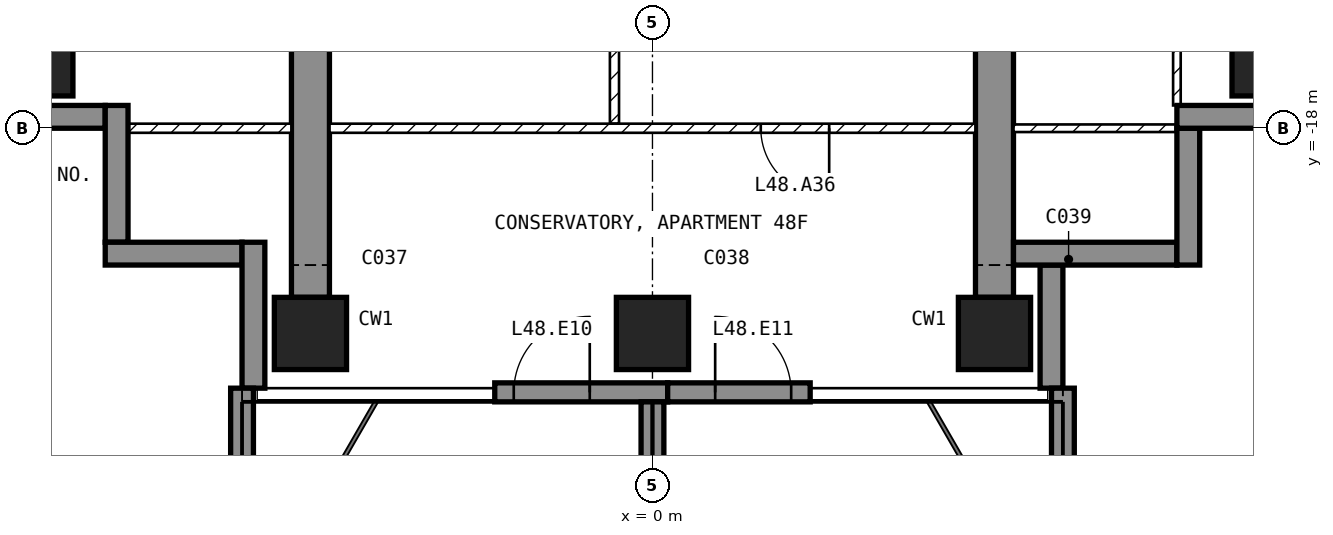
"""IFC4 building model, lengths in metres.
Left out: names, types, materials, properties, quantities, classifications, styles, units other than length and angle.
Written with IfcOpenShell. Run it as: python <this file> out.ifc"""

import sys

from ifc_helpers import new_model, si_unit, direction, frame, frame_2d, origin, origin_2d, place, context, subcontext, project, spatial, polyline, rectangle, outline, extrude, element, fill, save


model = new_model("IFC4")
c1 = context("Model", 3, precision=1e-05, world=origin(), true_north=direction((0.0, 1.0)))
c2 = subcontext(c1, "Body", "Model", "MODEL_VIEW")
j1 = project(units=[si_unit("LENGTHUNIT", "METRE"), si_unit("PLANEANGLEUNIT", "RADIAN")], contexts=[c1])
p1 = place(None, origin())
s1 = spatial("IfcSite", under=j1, at=p1, CompositionType="ELEMENT")
p2 = place(p1, origin())
s2 = spatial("IfcBuilding", under=s1, at=p2, CompositionType="ELEMENT")
p3 = place(p2, frame((0.0, 0.0, 194.6)))
s3 = spatial("IfcBuildingStorey", under=s2, at=p3, CompositionType="ELEMENT", Elevation=194.6)
for number, where, z_axis, x_axis in (
    (1, (-8.1, -17.1, -0.25), (0.0, 0.0, 1.0), (1.0, 0.0, 0.0)),
    (2, (-4.5, -20.7, -0.25), (0.0, 0.0, 1.0), (1.0, 0.0, 0.0)),
    (3, (0.0, -20.7, -0.25), (0.0, 0.0, 1.0), (1.0, 0.0, 0.0)),
    (4, (4.5, -20.7, -0.25), (0.0, 0.0, 1.0), (1.0, 0.0, 0.0)),
    (5, (8.1, -17.1, -0.25), (0.0, 0.0, 1.0), (1.0, 0.0, 0.0)),
):
    element("IfcColumn", number, at=place(p3, frame(where, z_axis=z_axis, x_axis=x_axis)), inside=s3, PredefinedType="COLUMN", context=c2, shape_type="SweptSolid", body=[
        extrude(rectangle(XDim=0.95, YDim=0.95, at=origin_2d()), origin(), (0.0, 0.0, 1.0), 3.5),
    ])
for number, where, z_axis, x_axis in (
    (6, (-4.75, -20.225, -0.25), (1.0, 0.0, 0.0), (0.0, 1.0, 0.0)),
    (7, (4.25, -20.225, -0.25), (1.0, 0.0, 0.0), (0.0, 1.0, 0.0)),
):
    element("IfcWall", number, at=place(p3, frame(where, z_axis=z_axis, x_axis=x_axis)), inside=s3, PredefinedType="SHEAR", context=c2, shape_type="SweptSolid", body=[
        extrude(outline(polyline([(0.0, 0.0), (6.725, 0.0), (6.725, 2.65), (9.125, 2.65), (9.125, 0.0), (11.225, 0.0), (11.225, 3.5), (0.0, 3.5), (0.0, 0.0)])), origin(), (0.0, 0.0, 1.0), 0.5),
    ])
p4 = place(p3, frame((-2.075, -21.475, 0.0), z_axis=(0.0, 0.0, 1.0), x_axis=(1.0, 0.0, 0.0)))
e8 = element("IfcWall", 8, at=p4, inside=s3, PredefinedType="SOLIDWALL", context=c2, shape_type="SweptSolid", body=[
    extrude(rectangle(XDim=2.275, YDim=0.25, at=frame_2d((1.137, 0.0))), origin(), (0.0, 0.0, 1.0), 3.25),
])
p5 = place(p4, frame((0.25, 0.0, 0.0)))
e9 = element("IfcOpeningElement", 9, at=p5, cuts=e8, PredefinedType="OPENING", context=c2, shape_type="SweptSolid", body=[
    extrude(rectangle(XDim=1.0, YDim=2.4, at=frame_2d((0.5, 1.2))), frame((0.0, 0.135, 0.0), z_axis=(0.0, -1.0, 0.0), x_axis=(1.0, 0.0, 0.0)), (0.0, 0.0, 1.0), 0.27),
])
p6 = place(p3, frame((0.2, -21.475, 0.0), z_axis=(0.0, 0.0, 1.0), x_axis=(1.0, 0.0, 0.0)))
e10 = element("IfcWall", 10, at=p6, inside=s3, PredefinedType="SOLIDWALL", context=c2, shape_type="SweptSolid", body=[
    extrude(rectangle(XDim=1.875, YDim=0.25, at=frame_2d((0.938, 0.0))), origin(), (0.0, 0.0, 1.0), 3.25),
])
p7 = place(p6, frame((0.625, 0.0, 0.0)))
e11 = element("IfcOpeningElement", 11, at=p7, cuts=e10, PredefinedType="OPENING", context=c2, shape_type="SweptSolid", body=[
    extrude(rectangle(XDim=1.0, YDim=2.4, at=frame_2d((0.5, 1.2))), frame((0.0, 0.135, 0.0), z_axis=(0.0, -1.0, 0.0), x_axis=(1.0, 0.0, 0.0)), (0.0, 0.0, 1.0), 0.27),
])
p8 = place(p3, frame((5.25, -21.42, 0.0), z_axis=(0.0, 0.0, 1.0), x_axis=(0.0, 1.0, 0.0)))
e12 = element("IfcWall", 12, at=p8, inside=s3, PredefinedType="SOLIDWALL", context=c2, shape_type="SweptSolid", body=[
    extrude(rectangle(XDim=1.62, YDim=0.3, at=frame_2d((0.81, 0.0))), origin(), (0.0, 0.0, 1.0), 3.25),
])
p9 = place(p3, frame((4.75, -19.65, 0.0), z_axis=(0.0, 0.0, 1.0), x_axis=(1.0, 0.0, 0.0)))
e13 = element("IfcWall", 13, at=p9, inside=s3, PredefinedType="SOLIDWALL", context=c2, shape_type="SweptSolid", body=[
    extrude(rectangle(XDim=2.15, YDim=0.3, at=frame_2d((1.075, 0.0))), origin(), (0.0, 0.0, 1.0), 3.25),
])
p10 = place(p3, frame((7.05, -19.8, 0.0), z_axis=(0.0, 0.0, 1.0), x_axis=(0.0, 1.0, 0.0)))
e14 = element("IfcWall", 14, at=p10, inside=s3, PredefinedType="SOLIDWALL", context=c2, shape_type="SweptSolid", body=[
    extrude(rectangle(XDim=1.8, YDim=0.3, at=frame_2d((0.9, 0.0))), origin(), (0.0, 0.0, 1.0), 3.25),
])
p11 = place(p3, frame((6.9, -17.85, 0.0), z_axis=(0.0, 0.0, 1.0), x_axis=(1.0, 0.0, 0.0)))
e15 = element("IfcWall", 15, at=p11, inside=s3, PredefinedType="SOLIDWALL", context=c2, shape_type="SweptSolid", body=[
    extrude(rectangle(XDim=1.85, YDim=0.3, at=frame_2d((0.925, 0.0))), origin(), (0.0, 0.0, 1.0), 3.25),
])
p12 = place(p3, frame((-8.75, -17.85, 0.0), z_axis=(0.0, 0.0, 1.0), x_axis=(1.0, 0.0, 0.0)))
e16 = element("IfcWall", 16, at=p12, inside=s3, PredefinedType="SOLIDWALL", context=c2, shape_type="SweptSolid", body=[
    extrude(rectangle(XDim=1.55, YDim=0.3, at=frame_2d((0.775, 0.0))), origin(), (0.0, 0.0, 1.0), 3.25),
])
for number, where, z_axis, x_axis in (
    (17, (-7.05, -17.7, 0.0), (0.0, 0.0, 1.0), (0.0, -1.0, 0.0)),
    (18, (-7.2, -19.65, 0.0), (0.0, 0.0, 1.0), (1.0, 0.0, 0.0)),
):
    element("IfcWall", number, at=place(p3, frame(where, z_axis=z_axis, x_axis=x_axis)), inside=s3, PredefinedType="SOLIDWALL", context=c2, shape_type="SweptSolid", body=[
        extrude(rectangle(XDim=1.8, YDim=0.3, at=frame_2d((0.9, 0.0))), origin(), (0.0, 0.0, 1.0), 3.25),
    ])
p13 = place(p3, frame((-5.25, -19.5, 0.0), z_axis=(0.0, 0.0, 1.0), x_axis=(0.0, -1.0, 0.0)))
e19 = element("IfcWall", 19, at=p13, inside=s3, PredefinedType="SOLIDWALL", context=c2, shape_type="SweptSolid", body=[
    extrude(rectangle(XDim=1.92, YDim=0.3, at=frame_2d((0.96, 0.0))), origin(), (0.0, 0.0, 1.0), 3.25),
])
p14 = place(p3, frame((-5.4, -21.42, 0.0), z_axis=(0.0, 0.0, 1.0), x_axis=(0.0, -1.0, 0.0)))
e20 = element("IfcWall", 20, at=p14, inside=s3, PredefinedType="SOLIDWALL", context=c2, shape_type="SweptSolid", body=[
    extrude(rectangle(XDim=2.88, YDim=0.3, at=frame_2d((1.44, 0.0))), origin(), (0.0, 0.0, 1.0), 3.25),
])
p15 = place(p3, frame((0.0, -21.6, 0.0), z_axis=(0.0, 0.0, 1.0), x_axis=(0.0, -1.0, 0.0)))
e21 = element("IfcWall", 21, at=p15, inside=s3, PredefinedType="SOLIDWALL", context=c2, shape_type="SweptSolid", body=[
    extrude(rectangle(XDim=2.7, YDim=0.3, at=frame_2d((1.35, 0.0))), origin(), (0.0, 0.0, 1.0), 3.25),
])
p16 = place(p3, frame((5.4, -21.42, 0.0), z_axis=(0.0, 0.0, 1.0), x_axis=(0.0, -1.0, 0.0)))
e22 = element("IfcWall", 22, at=p16, inside=s3, PredefinedType="SOLIDWALL", context=c2, shape_type="SweptSolid", body=[
    extrude(rectangle(XDim=2.88, YDim=0.3, at=frame_2d((1.44, 0.0))), origin(), (0.0, 0.0, 1.0), 3.25),
])
p17 = place(p3, frame((-0.5, -17.94, 0.0), z_axis=(0.0, 0.0, 1.0), x_axis=(0.0, 1.0, 0.0)))
e23 = element("IfcWall", 23, at=p17, inside=s3, PredefinedType="PARTITIONING", context=c2, shape_type="SweptSolid", body=[
    extrude(rectangle(XDim=2.88, YDim=0.12, at=frame_2d((1.44, 0.0))), origin(), (0.0, 0.0, 1.0), 3.25),
])
p18 = place(p17, frame((0.99, 0.0, 0.0)))
e24 = element("IfcOpeningElement", 24, at=p18, cuts=e23, PredefinedType="OPENING", context=c2, shape_type="SweptSolid", body=[
    extrude(rectangle(XDim=0.9, YDim=2.1, at=frame_2d((0.45, 1.05))), frame((0.0, 0.07, 0.0), z_axis=(0.0, -1.0, 0.0), x_axis=(1.0, 0.0, 0.0)), (0.0, 0.0, 1.0), 0.14),
])
p19 = place(p3, frame((4.25, -18.0, 0.0), z_axis=(0.0, 0.0, 1.0), x_axis=(-1.0, 0.0, 0.0)))
e25 = element("IfcWall", 25, at=p19, inside=s3, PredefinedType="PARTITIONING", context=c2, shape_type="SweptSolid", body=[
    extrude(rectangle(XDim=8.5, YDim=0.12, at=frame_2d((4.25, 0.0))), origin(), (0.0, 0.0, 1.0), 3.25),
])
p20 = place(p19, frame((1.925, 0.0, 0.0)))
e26 = element("IfcOpeningElement", 26, at=p20, cuts=e25, PredefinedType="OPENING", context=c2, shape_type="SweptSolid", body=[
    extrude(rectangle(XDim=0.9, YDim=2.1, at=frame_2d((0.45, 1.05))), frame((0.0, 0.07, 0.0), z_axis=(0.0, -1.0, 0.0), x_axis=(1.0, 0.0, 0.0)), (0.0, 0.0, 1.0), 0.14),
])
p21 = place(p3, frame((6.9, -17.7, 0.0), z_axis=(0.0, 0.0, 1.0), x_axis=(0.0, 1.0, 0.0)))
e27 = element("IfcWall", 27, at=p21, inside=s3, PredefinedType="PARTITIONING", context=c2, shape_type="SweptSolid", body=[
    extrude(rectangle(XDim=3.25, YDim=0.1, at=frame_2d((1.625, 0.0))), origin(), (0.0, 0.0, 1.0), 3.25),
])
p22 = place(p21, frame((2.05, 0.0, 0.0)))
e28 = element("IfcOpeningElement", 28, at=p22, cuts=e27, PredefinedType="OPENING", context=c2, shape_type="SweptSolid", body=[
    extrude(rectangle(XDim=0.85, YDim=2.1, at=frame_2d((0.425, 1.05))), frame((0.0, 0.06, 0.0), z_axis=(0.0, -1.0, 0.0), x_axis=(1.0, 0.0, 0.0)), (0.0, 0.0, 1.0), 0.12),
])
p23 = place(p3, frame((7.12, -18.0, 0.0), z_axis=(0.0, 0.0, 1.0), x_axis=(-1.0, 0.0, 0.0)))
e29 = element("IfcWall", 29, at=p23, inside=s3, PredefinedType="PARTITIONING", context=c2, shape_type="SweptSolid", body=[
    extrude(rectangle(XDim=2.37, YDim=0.1, at=frame_2d((1.185, 0.0))), origin(), (0.0, 0.0, 1.0), 3.25),
])
p24 = place(p3, frame((-4.75, -18.0, 0.0), z_axis=(0.0, 0.0, 1.0), x_axis=(-1.0, 0.0, 0.0)))
e30 = element("IfcWall", 30, at=p24, inside=s3, PredefinedType="PARTITIONING", context=c2, shape_type="SweptSolid", body=[
    extrude(rectangle(XDim=2.37, YDim=0.12, at=frame_2d((1.185, 0.0))), origin(), (0.0, 0.0, 1.0), 3.25),
])
p25 = place(p5, origin())
e31 = element("IfcDoor", 31, at=p25, inside=s3, OperationType="SINGLE_SWING_RIGHT", PredefinedType="DOOR", context=c2, shape_type="SweptSolid", body=[
    extrude(rectangle(XDim=1.0, YDim=2.4, at=frame_2d((0.5, 1.2))), frame((0.0, 0.025, 0.0), z_axis=(0.0, -1.0, 0.0), x_axis=(1.0, 0.0, 0.0)), (0.0, 0.0, 1.0), 0.05),
])
fill(e9, e31)
p26 = place(p7, origin())
e32 = element("IfcDoor", 32, at=p26, inside=s3, OperationType="SINGLE_SWING_LEFT", PredefinedType="DOOR", context=c2, shape_type="SweptSolid", body=[
    extrude(rectangle(XDim=1.0, YDim=2.4, at=frame_2d((0.5, 1.2))), frame((0.0, 0.025, 0.0), z_axis=(0.0, -1.0, 0.0), x_axis=(1.0, 0.0, 0.0)), (0.0, 0.0, 1.0), 0.05),
])
fill(e11, e32)
p27 = place(p20, origin())
e33 = element("IfcDoor", 33, at=p27, inside=s3, OperationType="SINGLE_SWING_LEFT", PredefinedType="DOOR", context=c2, shape_type="SweptSolid", body=[
    extrude(rectangle(XDim=0.9, YDim=2.1, at=frame_2d((0.45, 1.05))), frame((0.0, 0.025, 0.0), z_axis=(0.0, -1.0, 0.0), x_axis=(1.0, 0.0, 0.0)), (0.0, 0.0, 1.0), 0.05),
])
fill(e26, e33)
save(model, sys.argv[1])
